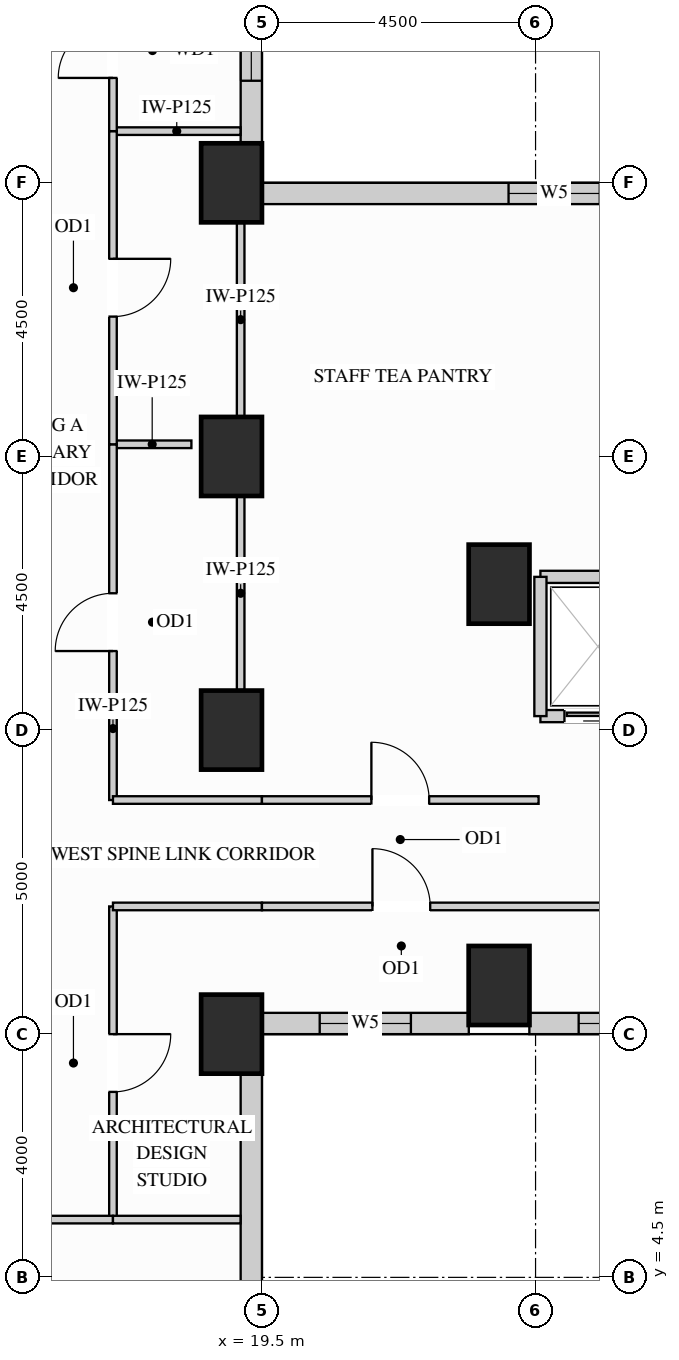
"""IFC4 building model, lengths in metres.
Left out: names, types, materials, properties, quantities, classifications, styles, units other than length and angle.
Written with IfcOpenShell. Run it as: python <this file> out.ifc"""

import sys

from ifc_helpers import new_model, si_unit, direction, frame, frame_2d, origin, origin_2d, place, context, subcontext, project, spatial, rectangle, extrude, source, transform, mapped, element, fill, save


model = new_model("IFC4")
c1 = context("Model", 3, precision=1e-05, world=origin(), true_north=direction((0.0, 1.0)))
c2 = subcontext(c1, "Body", "Model", "MODEL_VIEW")
j1 = project(units=[si_unit("LENGTHUNIT", "METRE"), si_unit("PLANEANGLEUNIT", "RADIAN")], contexts=[c1])
p1 = place(None, origin())
s1 = spatial("IfcSite", under=j1, at=p1, CompositionType="ELEMENT")
p2 = place(p1, origin())
s2 = spatial("IfcBuilding", under=s1, at=p2, CompositionType="ELEMENT")
p3 = place(p2, frame((0.0, 0.0, 47.7)))
s3 = spatial("IfcBuildingStorey", under=s2, at=p3, CompositionType="ELEMENT", Elevation=47.7)
m1 = source(origin(), c2, "Body", "SweptSolid", [
    extrude(rectangle(XDim=1.0, YDim=1.3, at=origin_2d()), origin(), (0.0, 0.0, 1.0), 3.38),
])
for number, where, z_axis, x_axis in (
    (1, (19.0, 13.5, 0.0), (0.0, 0.0, 1.0), (1.0, 0.0, 0.0)),
    (2, (19.0, 18.0, 0.0), (0.0, 0.0, 1.0), (1.0, 0.0, 0.0)),
    (3, (19.0, 22.5, 0.0), (0.0, 0.0, 1.0), (1.0, 0.0, 0.0)),
    (4, (19.0, 8.5, 0.0), (0.0, 0.0, 1.0), (1.0, 0.0, 0.0)),
    (5, (23.4, 15.9, 0.0), (0.0, 0.0, 1.0), (1.0, 0.0, 0.0)),
    (6, (23.4, 9.3, 0.0), (0.0, 0.0, 1.0), (1.0, 0.0, 0.0)),
):
    element("IfcColumn", number, at=place(p3, frame(where, z_axis=z_axis, x_axis=x_axis)), inside=s3, PredefinedType="COLUMN", context=c2, shape_type="MappedRepresentation", body=[
        mapped(m1, transform((0.0, 0.0, 0.0), x_axis=(1.0, 0.0, 0.0), y_axis=(0.0, 1.0, 0.0), z_axis=(0.0, 0.0, 1.0))),
    ])
m2 = source(origin(), c2, "Body", "SweptSolid", [
    extrude(rectangle(XDim=3.704, YDim=0.35, at=frame_2d((1.852, 0.0))), origin(), (0.0, 0.0, 1.0), 2.51),
])
p4 = place(p3, frame((19.325, 4.148, 0.0), z_axis=(0.0, 0.0, 1.0), x_axis=(0.0, 1.0, 0.0)))
e7 = element("IfcWall", 7, at=p4, inside=s3, PredefinedType="SOLIDWALL", context=c2, shape_type="MappedRepresentation", body=[
    mapped(m2, transform((0.0, 0.0, 0.0), x_axis=(1.0, 0.0, 0.0), y_axis=(0.0, 1.0, 0.0), z_axis=(0.0, 0.0, 1.0))),
])
p5 = place(p3, frame((19.498, 8.675, 0.0), z_axis=(0.0, 0.0, 1.0), x_axis=(1.0, 0.0, 0.0)))
e8 = element("IfcWall", 8, at=p5, inside=s3, PredefinedType="SOLIDWALL", context=c2, shape_type="SweptSolid", body=[
    extrude(rectangle(XDim=3.404, YDim=0.35, at=frame_2d((1.702, 0.0))), origin(), (0.0, 0.0, 1.0), 3.365),
])
p6 = place(p5, frame((0.952, 0.0, 0.78)))
e9 = element("IfcOpeningElement", 9, at=p6, cuts=e8, PredefinedType="OPENING", context=c2, shape_type="SweptSolid", body=[
    extrude(rectangle(XDim=1.5, YDim=2.0, at=frame_2d((0.75, 1.0))), frame((0.0, 0.185, 0.0), z_axis=(0.0, -1.0, 0.0), x_axis=(1.0, 0.0, 0.0)), (0.0, 0.0, 1.0), 0.37),
])
p7 = place(p3, frame((23.898, 8.675, 0.0), z_axis=(0.0, 0.0, 1.0), x_axis=(1.0, 0.0, 0.0)))
e10 = element("IfcWall", 10, at=p7, inside=s3, PredefinedType="SOLIDWALL", context=c2, shape_type="SweptSolid", body=[
    extrude(rectangle(XDim=6.104, YDim=0.35, at=frame_2d((3.052, 0.0))), origin(), (0.0, 0.0, 1.0), 3.365),
])
p8 = place(p7, frame((0.811, 0.0, 0.78)))
e11 = element("IfcOpeningElement", 11, at=p8, cuts=e10, PredefinedType="OPENING", context=c2, shape_type="SweptSolid", body=[
    extrude(rectangle(XDim=1.5, YDim=2.0, at=frame_2d((0.75, 1.0))), frame((0.0, 0.185, 0.0), z_axis=(0.0, -1.0, 0.0), x_axis=(1.0, 0.0, 0.0)), (0.0, 0.0, 1.0), 0.37),
])
p9 = place(p7, frame((3.793, 0.0, 0.78)))
e12 = element("IfcOpeningElement", 12, at=p9, cuts=e10, PredefinedType="OPENING", context=c2, shape_type="SweptSolid", body=[
    extrude(rectangle(XDim=1.5, YDim=2.0, at=frame_2d((0.75, 1.0))), frame((0.0, 0.185, 0.0), z_axis=(0.0, -1.0, 0.0), x_axis=(1.0, 0.0, 0.0)), (0.0, 0.0, 1.0), 0.37),
])
p10 = place(p3, frame((34.352, 22.325, 0.0), z_axis=(0.0, 0.0, 1.0), x_axis=(-1.0, 0.0, 0.0)))
e13 = element("IfcWall", 13, at=p10, inside=s3, PredefinedType="SOLIDWALL", context=c2, shape_type="SweptSolid", body=[
    extrude(rectangle(XDim=14.854, YDim=0.35, at=frame_2d((7.427, 0.0))), origin(), (0.0, 0.0, 1.0), 3.365),
])
p11 = place(p10, frame((4.058, 0.0, 0.78)))
e14 = element("IfcOpeningElement", 14, at=p11, cuts=e13, PredefinedType="OPENING", context=c2, shape_type="SweptSolid", body=[
    extrude(rectangle(XDim=1.5, YDim=2.0, at=frame_2d((0.75, 1.0))), frame((0.0, 0.185, 0.0), z_axis=(0.0, -1.0, 0.0), x_axis=(1.0, 0.0, 0.0)), (0.0, 0.0, 1.0), 0.37),
])
p12 = place(p10, frame((9.296, 0.0, 0.78)))
e15 = element("IfcOpeningElement", 15, at=p12, cuts=e13, PredefinedType="OPENING", context=c2, shape_type="SweptSolid", body=[
    extrude(rectangle(XDim=1.5, YDim=2.0, at=frame_2d((0.75, 1.0))), frame((0.0, 0.185, 0.0), z_axis=(0.0, -1.0, 0.0), x_axis=(1.0, 0.0, 0.0)), (0.0, 0.0, 1.0), 0.37),
])
p13 = place(p3, frame((19.325, 23.148, 0.0), z_axis=(0.0, 0.0, 1.0), x_axis=(0.0, 1.0, 0.0)))
e16 = element("IfcWall", 16, at=p13, inside=s3, PredefinedType="SOLIDWALL", context=c2, shape_type="SweptSolid", body=[
    extrude(rectangle(XDim=3.004, YDim=0.35, at=frame_2d((1.502, 0.0))), origin(), (0.0, 0.0, 1.0), 2.51),
])
p14 = place(p13, frame((1.031, 0.0, 0.78)))
e17 = element("IfcOpeningElement", 17, at=p14, cuts=e16, PredefinedType="OPENING", context=c2, shape_type="SweptSolid", body=[
    extrude(rectangle(XDim=1.5, YDim=1.55, at=frame_2d((0.75, 0.775))), frame((0.0, 0.185, 0.0), z_axis=(0.0, -1.0, 0.0), x_axis=(1.0, 0.0, 0.0)), (0.0, 0.0, 1.0), 0.37),
])
m3 = source(origin(), c2, "Body", "SweptSolid", [
    extrude(rectangle(XDim=1.29, YDim=0.125, at=frame_2d((0.645, 0.0))), origin(), (0.0, 0.0, 1.0), 2.67),
])
p15 = place(p3, frame((17.05, 18.2, 0.0), z_axis=(0.0, 0.0, 1.0), x_axis=(1.0, 0.0, 0.0)))
e18 = element("IfcWall", 18, at=p15, inside=s3, PredefinedType="PARTITIONING", context=c2, shape_type="MappedRepresentation", body=[
    mapped(m3, transform((0.0, 0.0, 0.0), x_axis=(1.0, 0.0, 0.0), y_axis=(0.0, 1.0, 0.0), z_axis=(0.0, 0.0, 1.0))),
])
m4 = source(origin(), c2, "Body", "SweptSolid", [
    extrude(rectangle(XDim=2.098, YDim=0.125, at=frame_2d((1.049, 0.0))), origin(), (0.0, 0.0, 1.0), 3.365),
])
p16 = place(p3, frame((17.05, 23.35, 0.0), z_axis=(0.0, 0.0, 1.0), x_axis=(1.0, 0.0, 0.0)))
e19 = element("IfcWall", 19, at=p16, inside=s3, PredefinedType="PARTITIONING", context=c2, shape_type="MappedRepresentation", body=[
    mapped(m4, transform((0.0, 0.0, 0.0), x_axis=(1.0, 0.0, 0.0), y_axis=(0.0, 1.0, 0.0), z_axis=(0.0, 0.0, 1.0))),
])
m5 = source(origin(), c2, "Body", "SweptSolid", [
    extrude(rectangle(XDim=3.18, YDim=0.125, at=frame_2d((1.59, 0.0))), origin(), (0.0, 0.0, 1.0), 2.67),
])
for number, where, z_axis, x_axis in (
    (20, (19.15, 14.16, 0.0), (0.0, 0.0, 1.0), (0.0, 1.0, 0.0)),
    (21, (19.15, 18.66, 0.0), (0.0, 0.0, 1.0), (0.0, 1.0, 0.0)),
):
    element("IfcWall", number, at=place(p3, frame(where, z_axis=z_axis, x_axis=x_axis)), inside=s3, PredefinedType="PARTITIONING", context=c2, shape_type="MappedRepresentation", body=[
        mapped(m5, transform((0.0, 0.0, 0.0), x_axis=(1.0, 0.0, 0.0), y_axis=(0.0, 1.0, 0.0), z_axis=(0.0, 0.0, 1.0))),
    ])
p17 = place(p3, frame((17.05, 12.35, 0.0), z_axis=(0.0, 0.0, 1.0), x_axis=(0.0, 1.0, 0.0)))
e22 = element("IfcWall", 22, at=p17, inside=s3, PredefinedType="PARTITIONING", context=c2, shape_type="SweptSolid", body=[
    extrude(rectangle(XDim=5.85, YDim=0.125, at=frame_2d((2.925, 0.0))), origin(), (0.0, 0.0, 1.0), 3.365),
])
p18 = place(p17, frame((2.45, 0.0, 0.0)))
e23 = element("IfcOpeningElement", 23, at=p18, cuts=e22, PredefinedType="OPENING", context=c2, shape_type="SweptSolid", body=[
    extrude(rectangle(XDim=0.95, YDim=2.15, at=frame_2d((0.475, 1.075))), frame((0.0, 0.073, 0.0), z_axis=(0.0, -1.0, 0.0), x_axis=(1.0, 0.0, 0.0)), (0.0, 0.0, 1.0), 0.145),
])
p19 = place(p3, frame((17.05, 18.2, 0.0), z_axis=(0.0, 0.0, 1.0), x_axis=(0.0, 1.0, 0.0)))
e24 = element("IfcWall", 24, at=p19, inside=s3, PredefinedType="PARTITIONING", context=c2, shape_type="SweptSolid", body=[
    extrude(rectangle(XDim=5.15, YDim=0.125, at=frame_2d((2.575, 0.0))), origin(), (0.0, 0.0, 1.0), 3.365),
])
p20 = place(p19, frame((2.1, 0.0, 0.0)))
e25 = element("IfcOpeningElement", 25, at=p20, cuts=e24, PredefinedType="OPENING", context=c2, shape_type="SweptSolid", body=[
    extrude(rectangle(XDim=0.95, YDim=2.15, at=frame_2d((0.475, 1.075))), frame((0.0, 0.073, 0.0), z_axis=(0.0, -1.0, 0.0), x_axis=(1.0, 0.0, 0.0)), (0.0, 0.0, 1.0), 0.145),
])
p21 = place(p3, frame((17.05, 5.45, 0.0), z_axis=(0.0, 0.0, 1.0), x_axis=(0.0, 1.0, 0.0)))
e26 = element("IfcWall", 26, at=p21, inside=s3, PredefinedType="PARTITIONING", context=c2, shape_type="SweptSolid", body=[
    extrude(rectangle(XDim=5.15, YDim=0.125, at=frame_2d((2.575, 0.0))), origin(), (0.0, 0.0, 1.0), 3.365),
])
p22 = place(p21, frame((2.1, 0.0, 0.0)))
e27 = element("IfcOpeningElement", 27, at=p22, cuts=e26, PredefinedType="OPENING", context=c2, shape_type="SweptSolid", body=[
    extrude(rectangle(XDim=0.95, YDim=2.15, at=frame_2d((0.475, 1.075))), frame((0.0, 0.073, 0.0), z_axis=(0.0, -1.0, 0.0), x_axis=(1.0, 0.0, 0.0)), (0.0, 0.0, 1.0), 0.145),
])
p23 = place(p3, frame((17.05, 23.35, 0.0), z_axis=(0.0, 0.0, 1.0), x_axis=(0.0, 1.0, 0.0)))
e28 = element("IfcWall", 28, at=p23, inside=s3, PredefinedType="PARTITIONING", context=c2, shape_type="SweptSolid", body=[
    extrude(rectangle(XDim=2.7, YDim=0.125, at=frame_2d((1.35, 0.0))), origin(), (0.0, 0.0, 1.0), 3.365),
])
p24 = place(p23, frame((0.875, 0.0, 0.0)))
e29 = element("IfcOpeningElement", 29, at=p24, cuts=e28, PredefinedType="OPENING", context=c2, shape_type="SweptSolid", body=[
    extrude(rectangle(XDim=0.9, YDim=2.15, at=frame_2d((0.45, 1.075))), frame((0.0, 0.073, 0.0), z_axis=(0.0, -1.0, 0.0), x_axis=(1.0, 0.0, 0.0)), (0.0, 0.0, 1.0), 0.145),
])
m6 = source(origin(), c2, "Body", "SweptSolid", [
    extrude(rectangle(XDim=2.45, YDim=0.125, at=frame_2d((1.225, 0.0))), origin(), (0.0, 0.0, 1.0), 3.365),
])
p25 = place(p3, frame((17.05, 12.35, 0.0), z_axis=(0.0, 0.0, 1.0), x_axis=(1.0, 0.0, 0.0)))
e30 = element("IfcWall", 30, at=p25, inside=s3, PredefinedType="PARTITIONING", context=c2, shape_type="MappedRepresentation", body=[
    mapped(m6, transform((0.0, 0.0, 0.0), x_axis=(1.0, 0.0, 0.0), y_axis=(0.0, 1.0, 0.0), z_axis=(0.0, 0.0, 1.0))),
])
p26 = place(p3, frame((19.5, 12.35, 0.0), z_axis=(0.0, 0.0, 1.0), x_axis=(1.0, 0.0, 0.0)))
e31 = element("IfcWall", 31, at=p26, inside=s3, PredefinedType="PARTITIONING", context=c2, shape_type="SweptSolid", body=[
    extrude(rectangle(XDim=4.55, YDim=0.125, at=frame_2d((2.275, 0.0))), origin(), (0.0, 0.0, 1.0), 3.365),
])
p27 = place(p26, frame((1.8, 0.0, 0.0)))
e32 = element("IfcOpeningElement", 32, at=p27, cuts=e31, PredefinedType="OPENING", context=c2, shape_type="SweptSolid", body=[
    extrude(rectangle(XDim=0.95, YDim=2.15, at=frame_2d((0.475, 1.075))), frame((0.0, 0.073, 0.0), z_axis=(0.0, -1.0, 0.0), x_axis=(1.0, 0.0, 0.0)), (0.0, 0.0, 1.0), 0.145),
])
p28 = place(p3, frame((17.05, 10.6, 0.0), z_axis=(0.0, 0.0, 1.0), x_axis=(1.0, 0.0, 0.0)))
e33 = element("IfcWall", 33, at=p28, inside=s3, PredefinedType="PARTITIONING", context=c2, shape_type="MappedRepresentation", body=[
    mapped(m6, transform((0.0, 0.0, 0.0), x_axis=(1.0, 0.0, 0.0), y_axis=(0.0, 1.0, 0.0), z_axis=(0.0, 0.0, 1.0))),
])
p29 = place(p3, frame((19.5, 10.6, 0.0), z_axis=(0.0, 0.0, 1.0), x_axis=(1.0, 0.0, 0.0)))
e34 = element("IfcWall", 34, at=p29, inside=s3, PredefinedType="PARTITIONING", context=c2, shape_type="SweptSolid", body=[
    extrude(rectangle(XDim=7.45, YDim=0.125, at=frame_2d((3.725, 0.0))), origin(), (0.0, 0.0, 1.0), 3.365),
])
p30 = place(p29, frame((1.817, 0.0, 0.0)))
e35 = element("IfcOpeningElement", 35, at=p30, cuts=e34, PredefinedType="OPENING", context=c2, shape_type="SweptSolid", body=[
    extrude(rectangle(XDim=0.95, YDim=2.15, at=frame_2d((0.475, 1.075))), frame((0.0, 0.073, 0.0), z_axis=(0.0, -1.0, 0.0), x_axis=(1.0, 0.0, 0.0)), (0.0, 0.0, 1.0), 0.145),
])
p31 = place(p3, frame((11.206, 5.45, 0.0), z_axis=(0.0, 0.0, 1.0), x_axis=(1.0, 0.0, 0.0)))
e36 = element("IfcWall", 36, at=p31, inside=s3, PredefinedType="PARTITIONING", context=c2, shape_type="SweptSolid", body=[
    extrude(rectangle(XDim=5.844, YDim=0.125, at=frame_2d((2.922, 0.0))), origin(), (0.0, 0.0, 1.0), 3.365),
])
p32 = place(p31, frame((2.447, 0.0, 0.0)))
e37 = element("IfcOpeningElement", 37, at=p32, cuts=e36, PredefinedType="OPENING", context=c2, shape_type="SweptSolid", body=[
    extrude(rectangle(XDim=0.95, YDim=2.15, at=frame_2d((0.475, 1.075))), frame((0.0, 0.073, 0.0), z_axis=(0.0, -1.0, 0.0), x_axis=(1.0, 0.0, 0.0)), (0.0, 0.0, 1.0), 0.145),
])
p33 = place(p3, frame((17.05, 5.45, 0.0), z_axis=(0.0, 0.0, 1.0), x_axis=(1.0, 0.0, 0.0)))
e38 = element("IfcWall", 38, at=p33, inside=s3, PredefinedType="PARTITIONING", context=c2, shape_type="MappedRepresentation", body=[
    mapped(m4, transform((0.0, 0.0, 0.0), x_axis=(1.0, 0.0, 0.0), y_axis=(0.0, 1.0, 0.0), z_axis=(0.0, 0.0, 1.0))),
])
m7 = source(origin(), c2, "Body", "SweptSolid", [
    extrude(rectangle(XDim=1.89, YDim=0.2, at=frame_2d((0.945, 0.0))), origin(), (0.0, 0.0, 1.0), 2.67),
])
p34 = place(p3, frame((24.08, 16.02, 0.0), z_axis=(0.0, 0.0, 1.0), x_axis=(1.0, 0.0, 0.0)))
e39 = element("IfcWall", 39, at=p34, inside=s3, PredefinedType="PARTITIONING", context=c2, shape_type="MappedRepresentation", body=[
    mapped(m7, transform((0.0, 0.0, 0.0), x_axis=(1.0, 0.0, 0.0), y_axis=(0.0, 1.0, 0.0), z_axis=(0.0, 0.0, 1.0))),
])
p35 = place(p3, frame((24.08, 13.73, 0.0), z_axis=(0.0, 0.0, 1.0), x_axis=(1.0, 0.0, 0.0)))
e40 = element("IfcWall", 40, at=p35, inside=s3, PredefinedType="PARTITIONING", context=c2, shape_type="SweptSolid", body=[
    extrude(rectangle(XDim=1.89, YDim=0.2, at=frame_2d((0.945, 0.0))), origin(), (0.0, 0.0, 1.0), 2.446),
])
p36 = place(p35, frame((0.395, 0.0, 0.0)))
e41 = element("IfcOpeningElement", 41, at=p36, cuts=e40, PredefinedType="OPENING", context=c2, shape_type="SweptSolid", body=[
    extrude(rectangle(XDim=1.1, YDim=2.2, at=frame_2d((0.55, 1.1))), frame((0.0, 0.11, 0.0), z_axis=(0.0, -1.0, 0.0), x_axis=(1.0, 0.0, 0.0)), (0.0, 0.0, 1.0), 0.22),
])
m8 = source(origin(), c2, "Body", "SweptSolid", [
    extrude(rectangle(XDim=2.29, YDim=0.2, at=frame_2d((1.145, 0.0))), origin(), (0.0, 0.0, 1.0), 3.365),
])
p37 = place(p3, frame((24.08, 13.73, 0.0), z_axis=(0.0, 0.0, 1.0), x_axis=(0.0, 1.0, 0.0)))
e42 = element("IfcWall", 42, at=p37, inside=s3, PredefinedType="PARTITIONING", context=c2, shape_type="MappedRepresentation", body=[
    mapped(m8, transform((0.0, 0.0, 0.0), x_axis=(1.0, 0.0, 0.0), y_axis=(0.0, 1.0, 0.0), z_axis=(0.0, 0.0, 1.0))),
])
m9 = source(origin(), c2, "Body", "SweptSolid", [
    extrude(rectangle(XDim=1.1, YDim=2.2, at=frame_2d((0.55, 1.1))), frame((0.0, 0.025, 0.0), z_axis=(0.0, -1.0, 0.0), x_axis=(1.0, 0.0, 0.0)), (0.0, 0.0, 1.0), 0.05),
])
p38 = place(p36, origin())
e43 = element("IfcDoor", 43, at=p38, inside=s3, OperationType="SLIDING_TO_LEFT", PredefinedType="DOOR", context=c2, shape_type="MappedRepresentation", body=[
    mapped(m9, transform((0.0, 0.0, 0.0), x_axis=(1.0, 0.0, 0.0), y_axis=(0.0, 1.0, 0.0), z_axis=(0.0, 0.0, 1.0))),
])
fill(e41, e43)
m10 = source(origin(), c2, "Body", "SweptSolid", [
    extrude(rectangle(XDim=0.95, YDim=2.15, at=frame_2d((0.475, 1.075))), frame((0.0, 0.025, 0.0), z_axis=(0.0, -1.0, 0.0), x_axis=(1.0, 0.0, 0.0)), (0.0, 0.0, 1.0), 0.05),
])
p39 = place(p22, origin())
e44 = element("IfcDoor", 44, at=p39, inside=s3, OperationType="SINGLE_SWING_RIGHT", PredefinedType="DOOR", context=c2, shape_type="MappedRepresentation", body=[
    mapped(m10, transform((0.0, 0.0, 0.0), x_axis=(1.0, 0.0, 0.0), y_axis=(0.0, 1.0, 0.0), z_axis=(0.0, 0.0, 1.0))),
])
fill(e27, e44)
p40 = place(p18, origin())
e45 = element("IfcDoor", 45, at=p40, inside=s3, OperationType="SINGLE_SWING_LEFT", PredefinedType="DOOR", context=c2, shape_type="MappedRepresentation", body=[
    mapped(m10, transform((0.0, 0.0, 0.0), x_axis=(1.0, 0.0, 0.0), y_axis=(0.0, 1.0, 0.0), z_axis=(0.0, 0.0, 1.0))),
])
fill(e23, e45)
p41 = place(p20, origin())
e46 = element("IfcDoor", 46, at=p41, inside=s3, OperationType="SINGLE_SWING_RIGHT", PredefinedType="DOOR", context=c2, shape_type="MappedRepresentation", body=[
    mapped(m10, transform((0.0, 0.0, 0.0), x_axis=(1.0, 0.0, 0.0), y_axis=(0.0, 1.0, 0.0), z_axis=(0.0, 0.0, 1.0))),
])
fill(e25, e46)
p42 = place(p27, origin())
e47 = element("IfcDoor", 47, at=p42, inside=s3, OperationType="SINGLE_SWING_LEFT", PredefinedType="DOOR", context=c2, shape_type="MappedRepresentation", body=[
    mapped(m10, transform((0.0, 0.0, 0.0), x_axis=(1.0, 0.0, 0.0), y_axis=(0.0, 1.0, 0.0), z_axis=(0.0, 0.0, 1.0))),
])
fill(e32, e47)
p43 = place(p30, origin())
e48 = element("IfcDoor", 48, at=p43, inside=s3, OperationType="SINGLE_SWING_LEFT", PredefinedType="DOOR", context=c2, shape_type="MappedRepresentation", body=[
    mapped(m10, transform((0.0, 0.0, 0.0), x_axis=(1.0, 0.0, 0.0), y_axis=(0.0, 1.0, 0.0), z_axis=(0.0, 0.0, 1.0))),
])
fill(e35, e48)
m11 = source(origin(), c2, "Body", "SweptSolid", [
    extrude(rectangle(XDim=0.9, YDim=2.15, at=frame_2d((0.45, 1.075))), frame((0.0, 0.025, 0.0), z_axis=(0.0, -1.0, 0.0), x_axis=(1.0, 0.0, 0.0)), (0.0, 0.0, 1.0), 0.05),
])
p44 = place(p24, origin())
e49 = element("IfcDoor", 49, at=p44, inside=s3, OperationType="SINGLE_SWING_LEFT", PredefinedType="DOOR", context=c2, shape_type="MappedRepresentation", body=[
    mapped(m11, transform((0.0, 0.0, 0.0), x_axis=(1.0, 0.0, 0.0), y_axis=(0.0, 1.0, 0.0), z_axis=(0.0, 0.0, 1.0))),
])
fill(e29, e49)
m12 = source(origin(), c2, "Body", "SweptSolid", [
    extrude(rectangle(XDim=1.5, YDim=2.0, at=frame_2d((0.75, 1.0))), frame((0.0, 0.03, 0.0), z_axis=(0.0, -1.0, 0.0), x_axis=(1.0, 0.0, 0.0)), (0.0, 0.0, 1.0), 0.06),
])
p45 = place(p6, origin())
e50 = element("IfcWindow", 50, at=p45, inside=s3, PartitioningType="SINGLE_PANEL", PredefinedType="WINDOW", context=c2, shape_type="MappedRepresentation", body=[
    mapped(m12, transform((0.0, 0.0, 0.0), x_axis=(1.0, 0.0, 0.0), y_axis=(0.0, 1.0, 0.0), z_axis=(0.0, 0.0, 1.0))),
])
fill(e9, e50)
p46 = place(p8, origin())
e51 = element("IfcWindow", 51, at=p46, inside=s3, PartitioningType="SINGLE_PANEL", PredefinedType="WINDOW", context=c2, shape_type="MappedRepresentation", body=[
    mapped(m12, transform((0.0, 0.0, 0.0), x_axis=(1.0, 0.0, 0.0), y_axis=(0.0, 1.0, 0.0), z_axis=(0.0, 0.0, 1.0))),
])
fill(e11, e51)
p47 = place(p12, origin())
e52 = element("IfcWindow", 52, at=p47, inside=s3, PartitioningType="SINGLE_PANEL", PredefinedType="WINDOW", context=c2, shape_type="MappedRepresentation", body=[
    mapped(m12, transform((0.0, 0.0, 0.0), x_axis=(1.0, 0.0, 0.0), y_axis=(0.0, 1.0, 0.0), z_axis=(0.0, 0.0, 1.0))),
])
fill(e15, e52)
m13 = source(origin(), c2, "Body", "SweptSolid", [
    extrude(rectangle(XDim=1.5, YDim=1.55, at=frame_2d((0.75, 0.775))), frame((0.0, 0.03, 0.0), z_axis=(0.0, -1.0, 0.0), x_axis=(1.0, 0.0, 0.0)), (0.0, 0.0, 1.0), 0.06),
])
p48 = place(p14, origin())
e53 = element("IfcWindow", 53, at=p48, inside=s3, PartitioningType="SINGLE_PANEL", PredefinedType="WINDOW", context=c2, shape_type="MappedRepresentation", body=[
    mapped(m13, transform((0.0, 0.0, 0.0), x_axis=(1.0, 0.0, 0.0), y_axis=(0.0, 1.0, 0.0), z_axis=(0.0, 0.0, 1.0))),
])
fill(e17, e53)
save(model, sys.argv[1])
